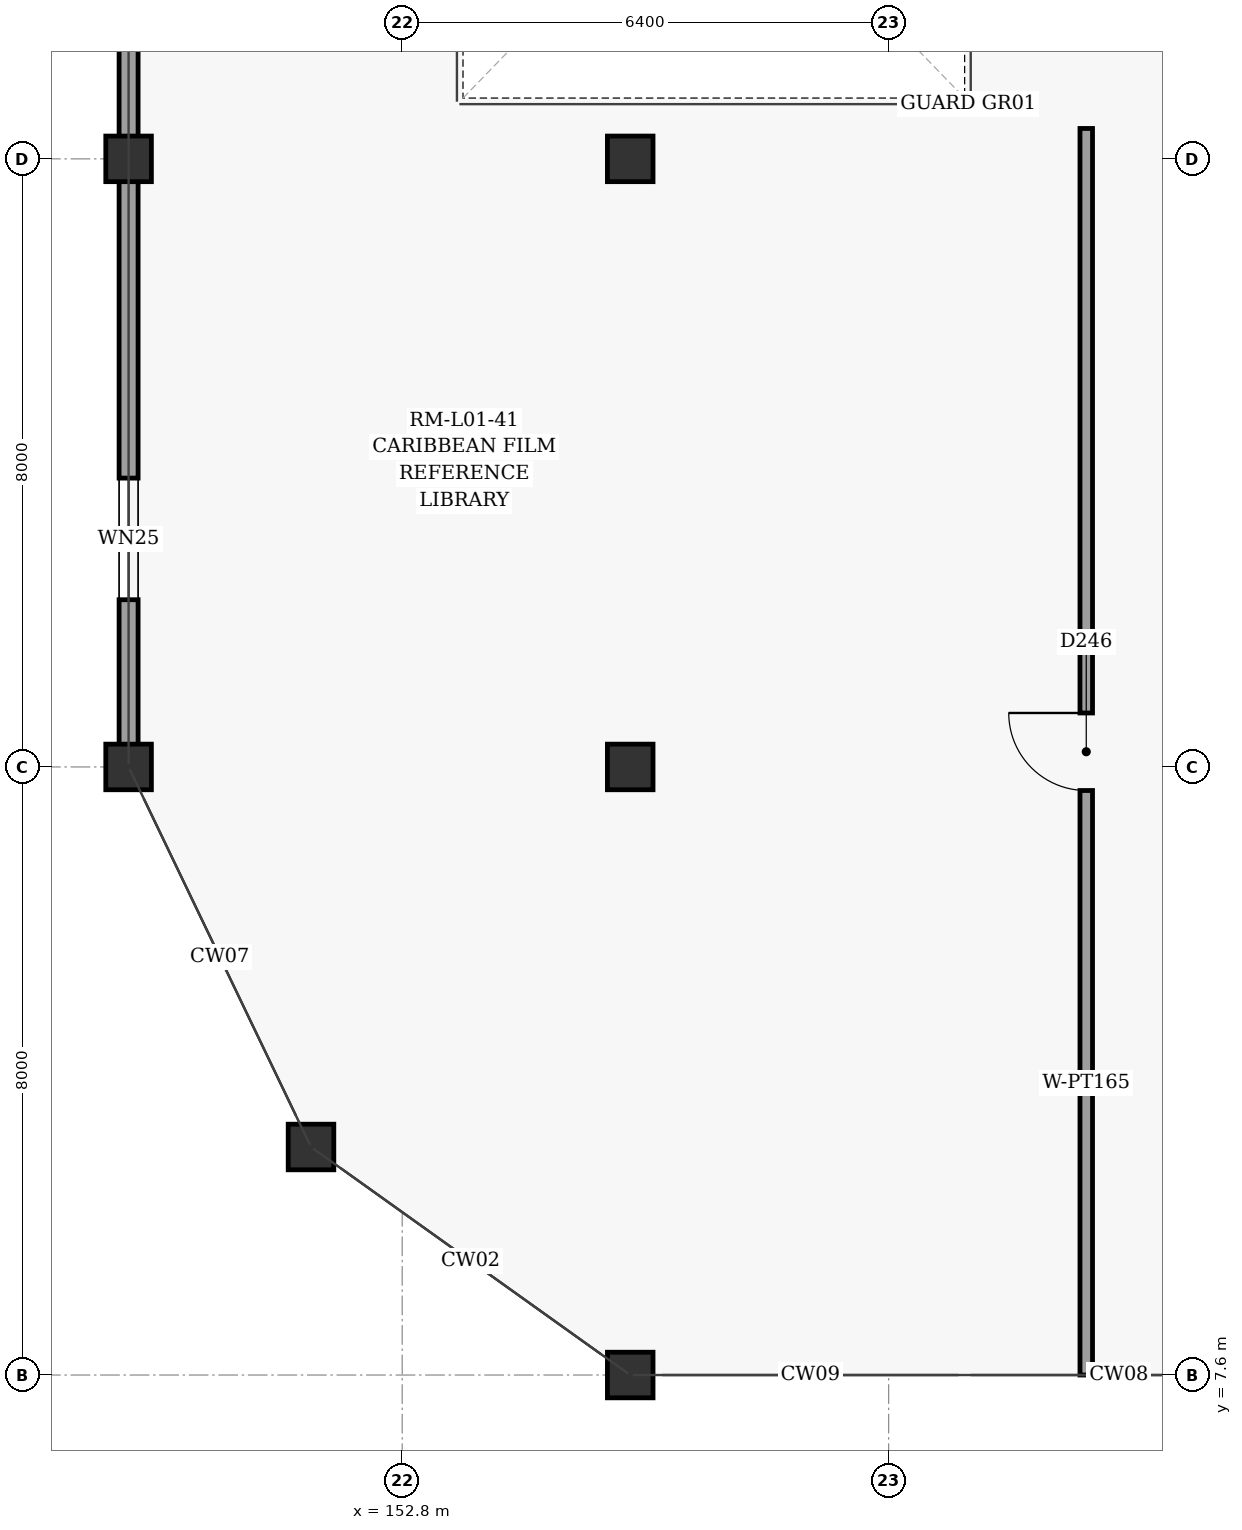
"""IFC4 building model, lengths in metres.
Left out: names, types, materials, properties, quantities, classifications, styles, units other than length and angle.
Written with IfcOpenShell. Run it as: python <this file> out.ifc"""

import sys

from ifc_helpers import new_model, si_unit, direction, frame, frame_2d, origin, origin_2d, place, context, subcontext, project, spatial, rectangle, extrude, element, fill, save


model = new_model("IFC4")
c1 = context("Model", 3, precision=1e-05, world=origin(), true_north=direction((0.0, 1.0)))
c2 = subcontext(c1, "Body", "Model", "MODEL_VIEW")
j1 = project(units=[si_unit("LENGTHUNIT", "METRE"), si_unit("PLANEANGLEUNIT", "RADIAN")], contexts=[c1])
p1 = place(None, origin())
s1 = spatial("IfcSite", under=j1, at=p1, CompositionType="ELEMENT")
p2 = place(p1, origin())
s2 = spatial("IfcBuilding", under=s1, at=p2, CompositionType="ELEMENT")
p3 = place(p2, frame((0.0, 0.0, 5.4)))
s3 = spatial("IfcBuildingStorey", under=s2, at=p3, CompositionType="ELEMENT", Elevation=5.4)
for number, where, z_axis, x_axis in (
    (1, (149.2, 15.6, 0.0), (0.0, 0.0, 1.0), (1.0, 0.0, 0.0)),
    (2, (149.2, 23.6, 0.0), (0.0, 0.0, 1.0), (1.0, 0.0, 0.0)),
    (3, (151.6, 10.6, 0.0), (0.0, 0.0, 1.0), (1.0, 0.0, 0.0)),
    (4, (155.8, 7.6, 0.0), (0.0, 0.0, 1.0), (1.0, 0.0, 0.0)),
    (5, (155.8, 15.6, 0.0), (0.0, 0.0, 1.0), (1.0, 0.0, 0.0)),
    (6, (155.8, 23.6, 0.0), (0.0, 0.0, 1.0), (1.0, 0.0, 0.0)),
):
    element("IfcColumn", number, at=place(p3, frame(where, z_axis=z_axis, x_axis=x_axis)), inside=s3, PredefinedType="COLUMN", context=c2, shape_type="SweptSolid", body=[
        extrude(rectangle(XDim=0.6, YDim=0.6, at=origin_2d()), origin(), (0.0, 0.0, 1.0), 4.8),
    ])
p4 = place(p3, frame((149.2, 15.6, 0.0), z_axis=(0.0, 0.0, 1.0), x_axis=(0.0, 1.0, 0.0)))
e7 = element("IfcWall", 7, at=p4, inside=s3, PredefinedType="SOLIDWALL", context=c2, shape_type="SweptSolid", body=[
    extrude(rectangle(XDim=48.0, YDim=0.25, at=frame_2d((24.0, 0.0))), origin(), (0.0, 0.0, 1.0), 3.67),
])
p5 = place(p4, frame((2.2, 0.0, 0.8)))
e8 = element("IfcOpeningElement", 8, at=p5, cuts=e7, PredefinedType="OPENING", context=c2, shape_type="SweptSolid", body=[
    extrude(rectangle(XDim=1.6, YDim=1.65, at=frame_2d((0.8, 0.825))), frame((0.0, 0.135, 0.0), z_axis=(0.0, -1.0, 0.0), x_axis=(1.0, 0.0, 0.0)), (0.0, 0.0, 1.0), 0.27),
])
p6 = place(p4, frame((9.6, 0.0, 0.8)))
e9 = element("IfcOpeningElement", 9, at=p6, cuts=e7, PredefinedType="OPENING", context=c2, shape_type="SweptSolid", body=[
    extrude(rectangle(XDim=1.6, YDim=1.65, at=frame_2d((0.8, 0.825))), frame((0.0, 0.135, 0.0), z_axis=(0.0, -1.0, 0.0), x_axis=(1.0, 0.0, 0.0)), (0.0, 0.0, 1.0), 0.27),
])
p7 = place(p4, frame((17.0, 0.0, 0.8)))
e10 = element("IfcOpeningElement", 10, at=p7, cuts=e7, PredefinedType="OPENING", context=c2, shape_type="SweptSolid", body=[
    extrude(rectangle(XDim=1.6, YDim=1.65, at=frame_2d((0.8, 0.825))), frame((0.0, 0.135, 0.0), z_axis=(0.0, -1.0, 0.0), x_axis=(1.0, 0.0, 0.0)), (0.0, 0.0, 1.0), 0.27),
])
p8 = place(p4, frame((25.15, 0.0, 0.8)))
e11 = element("IfcOpeningElement", 11, at=p8, cuts=e7, PredefinedType="OPENING", context=c2, shape_type="SweptSolid", body=[
    extrude(rectangle(XDim=1.4, YDim=2.1, at=frame_2d((0.7, 1.05))), frame((0.0, 0.135, 0.0), z_axis=(0.0, -1.0, 0.0), x_axis=(1.0, 0.0, 0.0)), (0.0, 0.0, 1.0), 0.27),
])
p9 = place(p4, frame((32.55, 0.0, 0.8)))
e12 = element("IfcOpeningElement", 12, at=p9, cuts=e7, PredefinedType="OPENING", context=c2, shape_type="SweptSolid", body=[
    extrude(rectangle(XDim=1.5, YDim=2.1, at=frame_2d((0.75, 1.05))), frame((0.0, 0.135, 0.0), z_axis=(0.0, -1.0, 0.0), x_axis=(1.0, 0.0, 0.0)), (0.0, 0.0, 1.0), 0.27),
])
p10 = place(p4, frame((37.75, 0.0, 0.8)))
e13 = element("IfcOpeningElement", 13, at=p10, cuts=e7, PredefinedType="OPENING", context=c2, shape_type="SweptSolid", body=[
    extrude(rectangle(XDim=1.6, YDim=2.1, at=frame_2d((0.8, 1.05))), frame((0.0, 0.135, 0.0), z_axis=(0.0, -1.0, 0.0), x_axis=(1.0, 0.0, 0.0)), (0.0, 0.0, 1.0), 0.27),
])
p11 = place(p3, frame((161.8, 7.6, 0.0), z_axis=(0.0, 0.0, 1.0), x_axis=(0.0, 1.0, 0.0)))
e14 = element("IfcWall", 14, at=p11, inside=s3, PredefinedType="PARTITIONING", context=c2, shape_type="SweptSolid", body=[
    extrude(rectangle(XDim=16.4, YDim=0.165, at=frame_2d((8.2, 0.0))), origin(), (0.0, 0.0, 1.0), 4.52),
])
p12 = place(p11, frame((7.69, 0.0, 0.0)))
e15 = element("IfcOpeningElement", 15, at=p12, cuts=e14, PredefinedType="OPENING", context=c2, shape_type="SweptSolid", body=[
    extrude(rectangle(XDim=1.02, YDim=2.1, at=frame_2d((0.51, 1.05))), frame((0.0, 0.093, 0.0), z_axis=(0.0, -1.0, 0.0), x_axis=(1.0, 0.0, 0.0)), (0.0, 0.0, 1.0), 0.185),
])
p13 = place(p5, origin())
e16 = element("IfcWindow", 16, at=p13, inside=s3, PartitioningType="SINGLE_PANEL", PredefinedType="WINDOW", context=c2, shape_type="SweptSolid", body=[
    extrude(rectangle(XDim=1.6, YDim=1.65, at=frame_2d((0.8, 0.825))), frame((0.0, 0.03, 0.0), z_axis=(0.0, -1.0, 0.0), x_axis=(1.0, 0.0, 0.0)), (0.0, 0.0, 1.0), 0.06),
])
fill(e8, e16)
p14 = place(p12, origin())
e17 = element("IfcDoor", 17, at=p14, inside=s3, OperationType="SINGLE_SWING_RIGHT", PredefinedType="DOOR", context=c2, shape_type="SweptSolid", body=[
    extrude(rectangle(XDim=1.02, YDim=2.1, at=frame_2d((0.51, 1.05))), frame((0.0, 0.025, 0.0), z_axis=(0.0, -1.0, 0.0), x_axis=(1.0, 0.0, 0.0)), (0.0, 0.0, 1.0), 0.05),
])
fill(e15, e17)
save(model, sys.argv[1])
